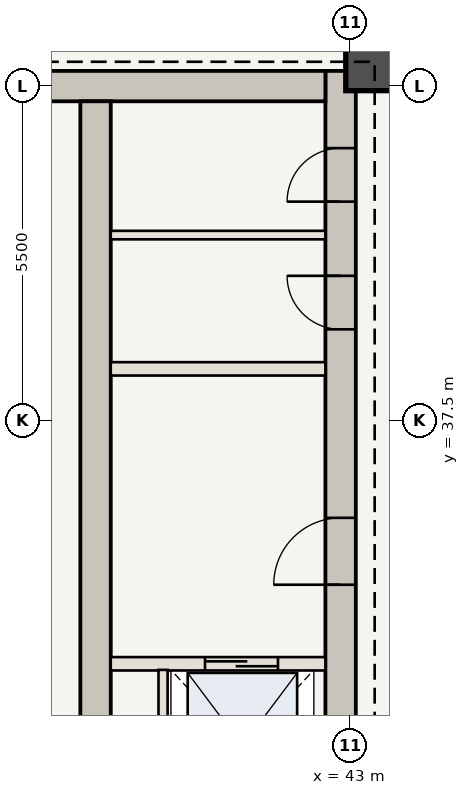
"""IFC4 building model, lengths in metres.
Left out: names, types, materials, properties, quantities, classifications, styles, units other than length and angle.
Written with IfcOpenShell. Run it as: python <this file> out.ifc"""

import sys

from ifc_helpers import new_model, si_unit, direction, frame, frame_2d, origin, origin_2d, place, context, subcontext, project, spatial, rectangle, extrude, element, fill, save


model = new_model("IFC4")
c1 = context("Model", 3, precision=1e-05, world=origin(), true_north=direction((0.0, 1.0)))
c2 = subcontext(c1, "Body", "Model", "MODEL_VIEW")
j1 = project(units=[si_unit("LENGTHUNIT", "METRE"), si_unit("PLANEANGLEUNIT", "RADIAN")], contexts=[c1])
p1 = place(None, origin())
s1 = spatial("IfcSite", under=j1, at=p1, CompositionType="ELEMENT")
p2 = place(p1, origin())
s2 = spatial("IfcBuilding", under=s1, at=p2, CompositionType="ELEMENT")
p3 = place(p2, frame((0.0, 0.0, 190.75)))
s3 = spatial("IfcBuildingStorey", under=s2, at=p3, CompositionType="ELEMENT", Elevation=190.75)
p4 = place(p3, frame((42.84, 30.6, 0.0), z_axis=(0.0, 0.0, 1.0), x_axis=(0.0, 1.0, 0.0)))
e1 = element("IfcWall", 1, at=p4, inside=s3, PredefinedType="SHEAR", context=c2, shape_type="SweptSolid", body=[
    extrude(rectangle(XDim=12.65, YDim=0.5, at=frame_2d((6.325, 0.0))), origin(), (0.0, 0.0, 1.0), 3.85),
])
p5 = place(p4, frame((4.2, 0.0, 0.0)))
e2 = element("IfcOpeningElement", 2, at=p5, cuts=e1, PredefinedType="OPENING", context=c2, shape_type="SweptSolid", body=[
    extrude(rectangle(XDim=1.1, YDim=2.15, at=frame_2d((0.55, 1.075))), frame((0.0, 0.26, 0.0), z_axis=(0.0, -1.0, 0.0), x_axis=(1.0, 0.0, 0.0)), (0.0, 0.0, 1.0), 0.52),
])
p6 = place(p4, frame((8.4, 0.0, 0.0)))
e3 = element("IfcOpeningElement", 3, at=p6, cuts=e1, PredefinedType="OPENING", context=c2, shape_type="SweptSolid", body=[
    extrude(rectangle(XDim=0.88, YDim=2.1, at=frame_2d((0.44, 1.05))), frame((0.0, 0.26, 0.0), z_axis=(0.0, -1.0, 0.0), x_axis=(1.0, 0.0, 0.0)), (0.0, 0.0, 1.0), 0.52),
])
p7 = place(p4, frame((10.5, 0.0, 0.0)))
e4 = element("IfcOpeningElement", 4, at=p7, cuts=e1, PredefinedType="OPENING", context=c2, shape_type="SweptSolid", body=[
    extrude(rectangle(XDim=0.88, YDim=2.1, at=frame_2d((0.44, 1.05))), frame((0.0, 0.26, 0.0), z_axis=(0.0, -1.0, 0.0), x_axis=(1.0, 0.0, 0.0)), (0.0, 0.0, 1.0), 0.52),
])
p8 = place(p3, frame((37.75, 43.0, 0.0), z_axis=(0.0, 0.0, 1.0), x_axis=(1.0, 0.0, 0.0)))
e5 = element("IfcWall", 5, at=p8, inside=s3, PredefinedType="SHEAR", context=c2, shape_type="SweptSolid", body=[
    extrude(rectangle(XDim=4.84, YDim=0.5, at=frame_2d((2.42, 0.0))), origin(), (0.0, 0.0, 1.0), 3.85),
])
p9 = place(p3, frame((38.81, 30.6, 0.0), z_axis=(0.0, 0.0, 1.0), x_axis=(0.0, 1.0, 0.0)))
e6 = element("IfcWall", 6, at=p9, inside=s3, PredefinedType="SHEAR", context=c2, shape_type="SweptSolid", body=[
    extrude(rectangle(XDim=12.15, YDim=0.5, at=frame_2d((6.075, 0.0))), origin(), (0.0, 0.0, 1.0), 3.85),
])
p10 = place(p3, frame((43.35, 43.35, 0.0), z_axis=(0.0, 0.0, 1.0), x_axis=(1.0, 0.0, 0.0)))
e7 = element("IfcColumn", 7, at=p10, inside=s3, PredefinedType="COLUMN", context=c2, shape_type="SweptSolid", body=[
    extrude(rectangle(XDim=0.85, YDim=0.85, at=origin_2d()), origin(), (0.0, 0.0, 1.0), 3.85),
])
p11 = place(p3, frame((39.06, 33.5, 0.0), z_axis=(0.0, 0.0, 1.0), x_axis=(1.0, 0.0, 0.0)))
e8 = element("IfcWall", 8, at=p11, inside=s3, PredefinedType="STANDARD", context=c2, shape_type="SweptSolid", body=[
    extrude(rectangle(XDim=3.53, YDim=0.22, at=frame_2d((1.765, 0.0))), origin(), (0.0, 0.0, 1.0), 3.685),
])
p12 = place(p11, frame((1.55, 0.0, 0.0)))
e9 = element("IfcOpeningElement", 9, at=p12, cuts=e8, PredefinedType="OPENING", context=c2, shape_type="SweptSolid", body=[
    extrude(rectangle(XDim=1.2, YDim=2.2, at=frame_2d((0.6, 1.1))), frame((0.0, 0.12, 0.0), z_axis=(0.0, -1.0, 0.0), x_axis=(1.0, 0.0, 0.0)), (0.0, 0.0, 1.0), 0.24),
])
p13 = place(p3, frame((39.92, 30.75, 0.0), z_axis=(0.0, 0.0, 1.0), x_axis=(0.0, 1.0, 0.0)))
e10 = element("IfcWall", 10, at=p13, inside=s3, PredefinedType="STANDARD", context=c2, shape_type="SweptSolid", body=[
    extrude(rectangle(XDim=2.65, YDim=0.15, at=frame_2d((1.325, 0.0))), origin(), (0.0, 0.0, 1.0), 3.685),
])
p14 = place(p3, frame((39.06, 38.35, 0.0), z_axis=(0.0, 0.0, 1.0), x_axis=(1.0, 0.0, 0.0)))
e11 = element("IfcWall", 11, at=p14, inside=s3, PredefinedType="STANDARD", context=c2, shape_type="SweptSolid", body=[
    extrude(rectangle(XDim=3.53, YDim=0.22, at=frame_2d((1.765, 0.0))), origin(), (0.0, 0.0, 1.0), 3.685),
])
p15 = place(p3, frame((39.06, 40.55, 0.0), z_axis=(0.0, 0.0, 1.0), x_axis=(1.0, 0.0, 0.0)))
e12 = element("IfcWall", 12, at=p15, inside=s3, PredefinedType="STANDARD", context=c2, shape_type="SweptSolid", body=[
    extrude(rectangle(XDim=3.53, YDim=0.14, at=frame_2d((1.765, 0.0))), origin(), (0.0, 0.0, 1.0), 3.685),
])
p16 = place(p5, origin())
e13 = element("IfcDoor", 13, at=p16, inside=s3, OperationType="SINGLE_SWING_LEFT", PredefinedType="DOOR", context=c2, shape_type="SweptSolid", body=[
    extrude(rectangle(XDim=1.1, YDim=2.15, at=frame_2d((0.55, 1.075))), frame((0.0, 0.025, 0.0), z_axis=(0.0, -1.0, 0.0), x_axis=(1.0, 0.0, 0.0)), (0.0, 0.0, 1.0), 0.05),
])
fill(e2, e13)
p17 = place(p6, origin())
e14 = element("IfcDoor", 14, at=p17, inside=s3, OperationType="SINGLE_SWING_RIGHT", PredefinedType="DOOR", context=c2, shape_type="SweptSolid", body=[
    extrude(rectangle(XDim=0.88, YDim=2.1, at=frame_2d((0.44, 1.05))), frame((0.0, 0.025, 0.0), z_axis=(0.0, -1.0, 0.0), x_axis=(1.0, 0.0, 0.0)), (0.0, 0.0, 1.0), 0.05),
])
fill(e3, e14)
p18 = place(p7, origin())
e15 = element("IfcDoor", 15, at=p18, inside=s3, OperationType="SINGLE_SWING_LEFT", PredefinedType="DOOR", context=c2, shape_type="SweptSolid", body=[
    extrude(rectangle(XDim=0.88, YDim=2.1, at=frame_2d((0.44, 1.05))), frame((0.0, 0.025, 0.0), z_axis=(0.0, -1.0, 0.0), x_axis=(1.0, 0.0, 0.0)), (0.0, 0.0, 1.0), 0.05),
])
fill(e4, e15)
p19 = place(p12, origin())
e16 = element("IfcDoor", 16, at=p19, inside=s3, OperationType="DOUBLE_DOOR_SLIDING", PredefinedType="DOOR", context=c2, shape_type="SweptSolid", body=[
    extrude(rectangle(XDim=1.2, YDim=2.2, at=frame_2d((0.6, 1.1))), frame((0.0, 0.025, 0.0), z_axis=(0.0, -1.0, 0.0), x_axis=(1.0, 0.0, 0.0)), (0.0, 0.0, 1.0), 0.05),
])
fill(e9, e16)
save(model, sys.argv[1])
